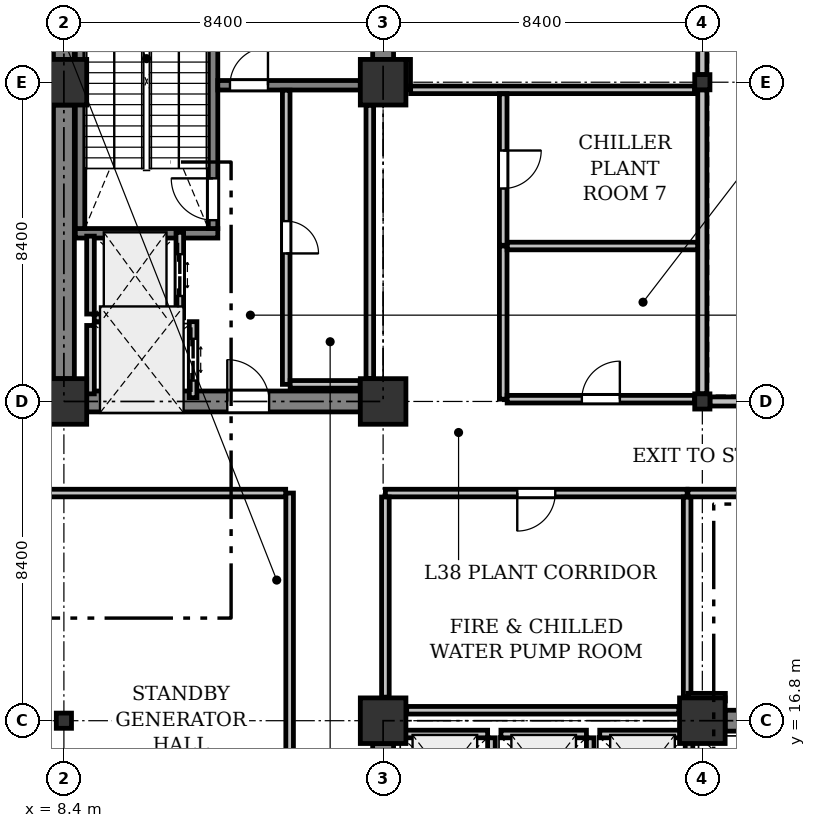
"""IFC4 building model, lengths in metres.
Left out: names, types, materials, properties, quantities, classifications, styles, units other than length and angle.
Written with IfcOpenShell. Run it as: python <this file> out.ifc"""

import sys

from ifc_helpers import new_model, si_unit, direction, frame, frame_2d, origin, origin_2d, place, context, subcontext, project, spatial, rectangle, i_section, extrude, element, fill, save


model = new_model("IFC4")
c1 = context("Model", 3, precision=1e-05, world=origin(), true_north=direction((0.0, 1.0)))
c2 = subcontext(c1, "Body", "Model", "MODEL_VIEW")
j1 = project(units=[si_unit("LENGTHUNIT", "METRE"), si_unit("PLANEANGLEUNIT", "RADIAN")], contexts=[c1])
p1 = place(None, origin())
s1 = spatial("IfcSite", under=j1, at=p1, CompositionType="ELEMENT")
p2 = place(p1, origin())
s2 = spatial("IfcBuilding", under=s1, at=p2, CompositionType="ELEMENT")
p3 = place(p2, frame((0.0, 0.0, 162.3)))
s3 = spatial("IfcBuildingStorey", under=s2, at=p3, CompositionType="ELEMENT", Elevation=162.3)
p4 = place(p3, frame((8.4, 16.8, 0.0), z_axis=(0.0, 0.0, 1.0), x_axis=(1.0, 0.0, 0.0)))
e1 = element("IfcColumn", 1, at=p4, inside=s3, PredefinedType="COLUMN", context=c2, shape_type="SweptSolid", body=[
    extrude(i_section(OverallWidth=0.4, OverallDepth=0.4, WebThickness=0.025, FlangeThickness=0.04, at=origin_2d()), origin(), (0.0, 0.0, 1.0), 5.0),
])
for number, where, z_axis, x_axis in (
    (2, (8.4, 25.2, 0.0), (0.0, 0.0, 1.0), (1.0, 0.0, 0.0)),
    (3, (8.4, 33.6, 0.0), (0.0, 0.0, 1.0), (1.0, 0.0, 0.0)),
    (4, (16.8, 16.8, 0.0), (0.0, 0.0, 1.0), (1.0, 0.0, 0.0)),
    (5, (16.8, 25.2, 0.0), (0.0, 0.0, 1.0), (1.0, 0.0, 0.0)),
    (6, (16.8, 33.6, 0.0), (0.0, 0.0, 1.0), (1.0, 0.0, 0.0)),
    (7, (25.2, 16.8, 0.0), (0.0, 0.0, 1.0), (1.0, 0.0, 0.0)),
):
    element("IfcColumn", number, at=place(p3, frame(where, z_axis=z_axis, x_axis=x_axis)), inside=s3, PredefinedType="COLUMN", context=c2, shape_type="SweptSolid", body=[
        extrude(rectangle(XDim=1.2, YDim=1.2, at=origin_2d()), origin(), (0.0, 0.0, 1.0), 5.0),
    ])
for number, where, z_axis, x_axis in (
    (8, (25.2, 25.2, 0.0), (0.0, 0.0, 1.0), (1.0, 0.0, 0.0)),
    (9, (25.2, 33.6, 0.0), (0.0, 0.0, 1.0), (1.0, 0.0, 0.0)),
):
    element("IfcColumn", number, at=place(p3, frame(where, z_axis=z_axis, x_axis=x_axis)), inside=s3, PredefinedType="COLUMN", context=c2, shape_type="SweptSolid", body=[
        extrude(i_section(OverallWidth=0.4, OverallDepth=0.4, WebThickness=0.025, FlangeThickness=0.04, at=origin_2d()), origin(), (0.0, 0.0, 1.0), 5.0),
    ])
for number, where, z_axis, x_axis in (
    (10, (25.2, 41.8, 0.0), (0.0, 0.0, 1.0), (0.0, -1.0, 0.0)),
    (11, (25.2, 33.4, 0.0), (0.0, 0.0, 1.0), (0.0, -1.0, 0.0)),
    (12, (25.4, 25.2, 0.0), (0.0, 0.0, 1.0), (1.0, 0.0, 0.0)),
):
    element("IfcWall", number, at=place(p3, frame(where, z_axis=z_axis, x_axis=x_axis)), inside=s3, PredefinedType="STANDARD", context=c2, shape_type="SweptSolid", body=[
        extrude(rectangle(XDim=8.0, YDim=0.24, at=frame_2d((4.0, 0.0))), origin(), (0.0, 0.0, 1.0), 4.425),
    ])
for number, where, z_axis, x_axis in (
    (13, (8.4, 25.8, 0.0), (0.0, 0.0, 1.0), (0.0, 1.0, 0.0)),
    (14, (8.4, 34.2, 0.0), (0.0, 0.0, 1.0), (0.0, 1.0, 0.0)),
):
    element("IfcWall", number, at=place(p3, frame(where, z_axis=z_axis, x_axis=x_axis)), inside=s3, PredefinedType="SHEAR", context=c2, shape_type="SweptSolid", body=[
        extrude(rectangle(XDim=7.2, YDim=0.55, at=frame_2d((3.6, 0.0))), origin(), (0.0, 0.0, 1.0), 4.725),
    ])
p5 = place(p3, frame((16.8, 34.2, 0.0), z_axis=(0.0, 0.0, 1.0), x_axis=(0.0, 1.0, 0.0)))
e15 = element("IfcWall", 15, at=p5, inside=s3, PredefinedType="SHEAR", context=c2, shape_type="SweptSolid", body=[
    extrude(rectangle(XDim=7.2, YDim=0.55, at=frame_2d((3.6, 0.0))), origin(), (0.0, 0.0, 1.0), 4.725),
])
p6 = place(p5, frame((0.9, 0.0, 0.0)))
e16 = element("IfcOpeningElement", 16, at=p6, cuts=e15, PredefinedType="OPENING", context=c2, shape_type="SweptSolid", body=[
    extrude(rectangle(XDim=1.1, YDim=2.15, at=frame_2d((0.55, 1.075))), frame((0.0, 0.285, 0.0), z_axis=(0.0, -1.0, 0.0), x_axis=(1.0, 0.0, 0.0)), (0.0, 0.0, 1.0), 0.57),
])
p7 = place(p3, frame((9.0, 25.2, 0.0), z_axis=(0.0, 0.0, 1.0), x_axis=(1.0, 0.0, 0.0)))
e17 = element("IfcWall", 17, at=p7, inside=s3, PredefinedType="SHEAR", context=c2, shape_type="SweptSolid", body=[
    extrude(rectangle(XDim=7.2, YDim=0.55, at=frame_2d((3.6, 0.0))), origin(), (0.0, 0.0, 1.0), 4.725),
])
p8 = place(p7, frame((3.7, 0.0, 0.0)))
e18 = element("IfcOpeningElement", 18, at=p8, cuts=e17, PredefinedType="OPENING", context=c2, shape_type="SweptSolid", body=[
    extrude(rectangle(XDim=1.1, YDim=2.15, at=frame_2d((0.55, 1.075))), frame((0.0, 0.285, 0.0), z_axis=(0.0, -1.0, 0.0), x_axis=(1.0, 0.0, 0.0)), (0.0, 0.0, 1.0), 0.57),
])
p9 = place(p3, frame((16.8, 9.0, 0.0), z_axis=(0.0, 0.0, 1.0), x_axis=(0.0, 1.0, 0.0)))
e19 = element("IfcWall", 19, at=p9, inside=s3, PredefinedType="SHEAR", context=c2, shape_type="SweptSolid", body=[
    extrude(rectangle(XDim=7.2, YDim=0.55, at=frame_2d((3.6, 0.0))), origin(), (0.0, 0.0, 1.0), 4.725),
])
p10 = place(p9, frame((3.25, 0.0, 0.0)))
e20 = element("IfcOpeningElement", 20, at=p10, cuts=e19, PredefinedType="OPENING", context=c2, shape_type="SweptSolid", body=[
    extrude(rectangle(XDim=1.1, YDim=2.15, at=frame_2d((0.55, 1.075))), frame((0.0, 0.285, 0.0), z_axis=(0.0, -1.0, 0.0), x_axis=(1.0, 0.0, 0.0)), (0.0, 0.0, 1.0), 0.57),
])
p11 = place(p3, frame((25.8, 16.8, 0.0), z_axis=(0.0, 0.0, 1.0), x_axis=(1.0, 0.0, 0.0)))
e21 = element("IfcWall", 21, at=p11, inside=s3, PredefinedType="SHEAR", context=c2, shape_type="SweptSolid", body=[
    extrude(rectangle(XDim=7.2, YDim=0.55, at=frame_2d((3.6, 0.0))), origin(), (0.0, 0.0, 1.0), 4.725),
])
p12 = place(p3, frame((12.45, 29.625, 0.0), z_axis=(0.0, 0.0, 1.0), x_axis=(-1.0, 0.0, 0.0)))
e22 = element("IfcWall", 22, at=p12, inside=s3, PredefinedType="SHEAR", context=c2, shape_type="SweptSolid", body=[
    extrude(rectangle(XDim=3.75, YDim=0.25, at=frame_2d((1.875, 0.0))), origin(), (0.0, 0.0, 1.0), 4.725),
])
p13 = place(p3, frame((12.325, 29.75, 0.0), z_axis=(0.0, 0.0, 1.0), x_axis=(0.0, 1.0, 0.0)))
e23 = element("IfcWall", 23, at=p13, inside=s3, PredefinedType="SHEAR", context=c2, shape_type="SweptSolid", body=[
    extrude(rectangle(XDim=7.75, YDim=0.25, at=frame_2d((3.875, 0.0))), origin(), (0.0, 0.0, 1.0), 4.725),
])
p14 = place(p13, frame((0.22, 0.0, 0.0)))
e24 = element("IfcOpeningElement", 24, at=p14, cuts=e23, PredefinedType="OPENING", context=c2, shape_type="SweptSolid", body=[
    extrude(rectangle(XDim=1.1, YDim=2.15, at=frame_2d((0.55, 1.075))), frame((0.0, 0.135, 0.0), z_axis=(0.0, -1.0, 0.0), x_axis=(1.0, 0.0, 0.0)), (0.0, 0.0, 1.0), 0.27),
])
p15 = place(p3, frame((8.825, 29.75, 0.0), z_axis=(0.0, 0.0, 1.0), x_axis=(0.0, 1.0, 0.0)))
e25 = element("IfcWall", 25, at=p15, inside=s3, PredefinedType="SHEAR", context=c2, shape_type="SweptSolid", body=[
    extrude(rectangle(XDim=7.75, YDim=0.25, at=frame_2d((3.875, 0.0))), origin(), (0.0, 0.0, 1.0), 4.725),
])
p16 = place(p3, frame((12.45, 33.52, 0.0), z_axis=(0.0, 0.0, 1.0), x_axis=(1.0, 0.0, 0.0)))
e26 = element("IfcWall", 26, at=p16, inside=s3, PredefinedType="SHEAR", context=c2, shape_type="SweptSolid", body=[
    extrude(rectangle(XDim=3.75, YDim=0.25, at=frame_2d((1.875, 0.0))), origin(), (0.0, 0.0, 1.0), 4.725),
])
p17 = place(p16, frame((0.32, 0.0, 0.0)))
e27 = element("IfcOpeningElement", 27, at=p17, cuts=e26, PredefinedType="OPENING", context=c2, shape_type="SweptSolid", body=[
    extrude(rectangle(XDim=1.0, YDim=2.15, at=frame_2d((0.5, 1.075))), frame((0.0, 0.135, 0.0), z_axis=(0.0, -1.0, 0.0), x_axis=(1.0, 0.0, 0.0)), (0.0, 0.0, 1.0), 0.27),
])
p18 = place(p3, frame((11.45, 27.4, 0.0), z_axis=(0.0, 0.0, 1.0), x_axis=(0.0, 1.0, 0.0)))
e28 = element("IfcWall", 28, at=p18, inside=s3, PredefinedType="PARTITIONING", context=c2, shape_type="SweptSolid", body=[
    extrude(rectangle(XDim=2.25, YDim=0.2, at=frame_2d((1.125, 0.0))), origin(), (0.0, 0.0, 1.0), 4.725),
])
p19 = place(p18, frame((0.575, 0.0, 0.0)))
e29 = element("IfcOpeningElement", 29, at=p19, cuts=e28, PredefinedType="OPENING", context=c2, shape_type="SweptSolid", body=[
    extrude(rectangle(XDim=1.1, YDim=2.2, at=frame_2d((0.55, 1.1))), frame((0.0, 0.11, 0.0), z_axis=(0.0, -1.0, 0.0), x_axis=(1.0, 0.0, 0.0)), (0.0, 0.0, 1.0), 0.22),
])
p20 = place(p3, frame((9.1, 27.5, 0.0), z_axis=(0.0, 0.0, 1.0), x_axis=(0.0, 1.0, 0.0)))
e30 = element("IfcWall", 30, at=p20, inside=s3, PredefinedType="PARTITIONING", context=c2, shape_type="SweptSolid", body=[
    extrude(rectangle(XDim=2.05, YDim=0.2, at=frame_2d((1.025, 0.0))), origin(), (0.0, 0.0, 1.0), 4.725),
])
p21 = place(p3, frame((9.2, 27.4, 0.0), z_axis=(0.0, 0.0, 1.0), x_axis=(1.0, 0.0, 0.0)))
e31 = element("IfcWall", 31, at=p21, inside=s3, PredefinedType="PARTITIONING", context=c2, shape_type="SweptSolid", body=[
    extrude(rectangle(XDim=2.15, YDim=0.2, at=frame_2d((1.075, 0.0))), origin(), (0.0, 0.0, 1.0), 4.725),
])
p22 = place(p3, frame((11.8, 25.3, 0.0), z_axis=(0.0, 0.0, 1.0), x_axis=(0.0, 1.0, 0.0)))
e32 = element("IfcWall", 32, at=p22, inside=s3, PredefinedType="PARTITIONING", context=c2, shape_type="SweptSolid", body=[
    extrude(rectangle(XDim=2.0, YDim=0.2, at=frame_2d((1.0, 0.0))), origin(), (0.0, 0.0, 1.0), 4.725),
])
p23 = place(p22, frame((0.45, 0.0, 0.0)))
e33 = element("IfcOpeningElement", 33, at=p23, cuts=e32, PredefinedType="OPENING", context=c2, shape_type="SweptSolid", body=[
    extrude(rectangle(XDim=1.1, YDim=2.2, at=frame_2d((0.55, 1.1))), frame((0.0, 0.11, 0.0), z_axis=(0.0, -1.0, 0.0), x_axis=(1.0, 0.0, 0.0)), (0.0, 0.0, 1.0), 0.22),
])
p24 = place(p3, frame((9.1, 25.4, 0.0), z_axis=(0.0, 0.0, 1.0), x_axis=(0.0, 1.0, 0.0)))
e34 = element("IfcWall", 34, at=p24, inside=s3, PredefinedType="PARTITIONING", context=c2, shape_type="SweptSolid", body=[
    extrude(rectangle(XDim=1.8, YDim=0.2, at=frame_2d((0.9, 0.0))), origin(), (0.0, 0.0, 1.0), 4.725),
])
p25 = place(p3, frame((19.65, 14.3, 0.0), z_axis=(0.0, 0.0, 1.0), x_axis=(0.0, 1.0, 0.0)))
e35 = element("IfcWall", 35, at=p25, inside=s3, PredefinedType="PARTITIONING", context=c2, shape_type="SweptSolid", body=[
    extrude(rectangle(XDim=2.05, YDim=0.2, at=frame_2d((1.025, 0.0))), origin(), (0.0, 0.0, 1.0), 4.725),
])
p26 = place(p3, frame((17.3, 16.45, 0.0), z_axis=(0.0, 0.0, 1.0), x_axis=(1.0, 0.0, 0.0)))
e36 = element("IfcWall", 36, at=p26, inside=s3, PredefinedType="PARTITIONING", context=c2, shape_type="SweptSolid", body=[
    extrude(rectangle(XDim=2.25, YDim=0.2, at=frame_2d((1.125, 0.0))), origin(), (0.0, 0.0, 1.0), 4.725),
])
p27 = place(p3, frame((22.25, 14.3, 0.0), z_axis=(0.0, 0.0, 1.0), x_axis=(0.0, 1.0, 0.0)))
e37 = element("IfcWall", 37, at=p27, inside=s3, PredefinedType="PARTITIONING", context=c2, shape_type="SweptSolid", body=[
    extrude(rectangle(XDim=2.05, YDim=0.2, at=frame_2d((1.025, 0.0))), origin(), (0.0, 0.0, 1.0), 4.725),
])
p28 = place(p3, frame((19.9, 16.45, 0.0), z_axis=(0.0, 0.0, 1.0), x_axis=(1.0, 0.0, 0.0)))
e38 = element("IfcWall", 38, at=p28, inside=s3, PredefinedType="PARTITIONING", context=c2, shape_type="SweptSolid", body=[
    extrude(rectangle(XDim=2.25, YDim=0.2, at=frame_2d((1.125, 0.0))), origin(), (0.0, 0.0, 1.0), 4.725),
])
p29 = place(p3, frame((24.85, 14.3, 0.0), z_axis=(0.0, 0.0, 1.0), x_axis=(0.0, 1.0, 0.0)))
e39 = element("IfcWall", 39, at=p29, inside=s3, PredefinedType="PARTITIONING", context=c2, shape_type="SweptSolid", body=[
    extrude(rectangle(XDim=2.05, YDim=0.2, at=frame_2d((1.025, 0.0))), origin(), (0.0, 0.0, 1.0), 4.725),
])
p30 = place(p3, frame((22.5, 16.45, 0.0), z_axis=(0.0, 0.0, 1.0), x_axis=(1.0, 0.0, 0.0)))
e40 = element("IfcWall", 40, at=p30, inside=s3, PredefinedType="PARTITIONING", context=c2, shape_type="SweptSolid", body=[
    extrude(rectangle(XDim=2.25, YDim=0.2, at=frame_2d((1.125, 0.0))), origin(), (0.0, 0.0, 1.0), 4.725),
])
p31 = place(p3, frame((16.45, 25.805, 0.0), z_axis=(0.0, 0.0, 1.0), x_axis=(0.0, 1.0, 0.0)))
e41 = element("IfcWall", 41, at=p31, inside=s3, PredefinedType="PARTITIONING", context=c2, shape_type="SweptSolid", body=[
    extrude(rectangle(XDim=7.19, YDim=0.2, at=frame_2d((3.595, 0.0))), origin(), (0.0, 0.0, 1.0), 4.725),
])
p32 = place(p3, frame((14.25, 33.39, 0.0), z_axis=(0.0, 0.0, 1.0), x_axis=(0.0, -1.0, 0.0)))
e42 = element("IfcWall", 42, at=p32, inside=s3, PredefinedType="PARTITIONING", context=c2, shape_type="SweptSolid", body=[
    extrude(rectangle(XDim=7.74, YDim=0.2, at=frame_2d((3.87, 0.0))), origin(), (0.0, 0.0, 1.0), 4.725),
])
p33 = place(p32, frame((3.445, 0.0, 0.0)))
e43 = element("IfcOpeningElement", 43, at=p33, cuts=e42, PredefinedType="OPENING", context=c2, shape_type="SweptSolid", body=[
    extrude(rectangle(XDim=0.85, YDim=2.15, at=frame_2d((0.425, 1.075))), frame((0.0, 0.11, 0.0), z_axis=(0.0, -1.0, 0.0), x_axis=(1.0, 0.0, 0.0)), (0.0, 0.0, 1.0), 0.22),
])
p34 = place(p3, frame((14.354, 25.65, 0.0), z_axis=(0.0, 0.0, 1.0), x_axis=(1.0, 0.0, 0.0)))
e44 = element("IfcWall", 44, at=p34, inside=s3, PredefinedType="PARTITIONING", context=c2, shape_type="SweptSolid", body=[
    extrude(rectangle(XDim=1.841, YDim=0.2, at=frame_2d((0.92, 0.0))), origin(), (0.0, 0.0, 1.0), 4.725),
])
p35 = place(p3, frame((17.42, 34.2, 0.0), z_axis=(0.0, 0.0, 1.0), x_axis=(0.0, -1.0, 0.0)))
e45 = element("IfcWall", 45, at=p35, inside=s3, PredefinedType="PARTITIONING", context=c2, shape_type="SweptSolid", body=[
    extrude(rectangle(XDim=0.8, YDim=0.2, at=frame_2d((0.4, 0.0))), origin(), (0.0, 0.0, 1.0), 3.825),
])
p36 = place(p3, frame((17.524, 33.4, 0.0), z_axis=(0.0, 0.0, 1.0), x_axis=(1.0, 0.0, 0.0)))
e46 = element("IfcWall", 46, at=p36, inside=s3, PredefinedType="PARTITIONING", context=c2, shape_type="SweptSolid", body=[
    extrude(rectangle(XDim=7.471, YDim=0.2, at=frame_2d((3.736, 0.0))), origin(), (0.0, 0.0, 1.0), 3.825),
])
p37 = place(p3, frame((14.34, 5.4, 0.0), z_axis=(0.0, 0.0, 1.0), x_axis=(0.0, 1.0, 0.0)))
e47 = element("IfcWall", 47, at=p37, inside=s3, PredefinedType="PARTITIONING", context=c2, shape_type="SweptSolid", body=[
    extrude(rectangle(XDim=17.39, YDim=0.2, at=frame_2d((8.695, 0.0))), origin(), (0.0, 0.0, 1.0), 3.825),
])
p38 = place(p3, frame((14.236, 22.79, 0.0), z_axis=(0.0, 0.0, 1.0), x_axis=(-1.0, 0.0, 0.0)))
e48 = element("IfcWall", 48, at=p38, inside=s3, PredefinedType="PARTITIONING", context=c2, shape_type="SweptSolid", body=[
    extrude(rectangle(XDim=6.526, YDim=0.2, at=frame_2d((3.263, 0.0))), origin(), (0.0, 0.0, 1.0), 3.709),
])
p39 = place(p3, frame((24.8, 22.79, 0.0), z_axis=(0.0, 0.0, 1.0), x_axis=(-1.0, 0.0, 0.0)))
e49 = element("IfcWall", 49, at=p39, inside=s3, PredefinedType="PARTITIONING", context=c2, shape_type="SweptSolid", body=[
    extrude(rectangle(XDim=7.94, YDim=0.2, at=frame_2d((3.97, 0.0))), origin(), (0.0, 0.0, 1.0), 3.709),
])
p40 = place(p39, frame((3.47, 0.0, 0.0)))
e50 = element("IfcOpeningElement", 50, at=p40, cuts=e49, PredefinedType="OPENING", context=c2, shape_type="SweptSolid", body=[
    extrude(rectangle(XDim=1.0, YDim=2.15, at=frame_2d((0.5, 1.075))), frame((0.0, 0.11, 0.0), z_axis=(0.0, -1.0, 0.0), x_axis=(1.0, 0.0, 0.0)), (0.0, 0.0, 1.0), 0.22),
])
p41 = place(p3, frame((16.86, 22.686, 0.0), z_axis=(0.0, 0.0, 1.0), x_axis=(0.0, -1.0, 0.0)))
e51 = element("IfcWall", 51, at=p41, inside=s3, PredefinedType="PARTITIONING", context=c2, shape_type="SweptSolid", body=[
    extrude(rectangle(XDim=5.266, YDim=0.2, at=frame_2d((2.633, 0.0))), origin(), (0.0, 0.0, 1.0), 3.709),
])
p42 = place(p3, frame((17.42, 17.075, 0.0), z_axis=(0.0, 0.0, 1.0), x_axis=(1.0, 0.0, 0.0)))
e52 = element("IfcWall", 52, at=p42, inside=s3, PredefinedType="PARTITIONING", context=c2, shape_type="SweptSolid", body=[
    extrude(rectangle(XDim=7.16, YDim=0.2, at=frame_2d((3.58, 0.0))), origin(), (0.0, 0.0, 1.0), 3.825),
])
p43 = place(p3, frame((24.8, 17.42, 0.0), z_axis=(0.0, 0.0, 1.0), x_axis=(0.0, 1.0, 0.0)))
e53 = element("IfcWall", 53, at=p43, inside=s3, PredefinedType="PARTITIONING", context=c2, shape_type="SweptSolid", body=[
    extrude(rectangle(XDim=5.266, YDim=0.2, at=frame_2d((2.633, 0.0))), origin(), (0.0, 0.0, 1.0), 4.725),
])
p44 = place(p3, frame((32.636, 22.79, 0.0), z_axis=(0.0, 0.0, 1.0), x_axis=(-1.0, 0.0, 0.0)))
e54 = element("IfcWall", 54, at=p44, inside=s3, PredefinedType="PARTITIONING", context=c2, shape_type="SweptSolid", body=[
    extrude(rectangle(XDim=7.816, YDim=0.2, at=frame_2d((3.908, 0.0))), origin(), (0.0, 0.0, 1.0), 3.709),
])
p45 = place(p44, frame((3.408, 0.0, 0.0)))
e55 = element("IfcOpeningElement", 55, at=p45, cuts=e54, PredefinedType="OPENING", context=c2, shape_type="SweptSolid", body=[
    extrude(rectangle(XDim=1.0, YDim=2.15, at=frame_2d((0.5, 1.075))), frame((0.0, 0.11, 0.0), z_axis=(0.0, -1.0, 0.0), x_axis=(1.0, 0.0, 0.0)), (0.0, 0.0, 1.0), 0.22),
])
p46 = place(p3, frame((24.82, 17.42, 0.0), z_axis=(0.0, 0.0, 1.0), x_axis=(0.999999724019, -0.000742941845, 0.0)))
e56 = element("IfcWall", 56, at=p46, inside=s3, PredefinedType="PARTITIONING", context=c2, shape_type="SweptSolid", body=[
    extrude(rectangle(XDim=0.986, YDim=0.2, at=frame_2d((0.493, 0.0))), origin(), (0.0, 0.0, 1.0), 3.709),
])
p47 = place(p3, frame((19.96, 29.29, 0.0), z_axis=(0.0, 0.0, 1.0), x_axis=(0.0, -1.0, 0.0)))
e57 = element("IfcWall", 57, at=p47, inside=s3, PredefinedType="PARTITIONING", context=c2, shape_type="SweptSolid", body=[
    extrude(rectangle(XDim=4.03, YDim=0.2, at=frame_2d((2.015, 0.0))), origin(), (0.0, 0.0, 1.0), 3.825),
])
p48 = place(p3, frame((20.064, 25.26, 0.0), z_axis=(0.0, 0.0, 1.0), x_axis=(1.0, 0.0, 0.0)))
e58 = element("IfcWall", 58, at=p48, inside=s3, PredefinedType="PARTITIONING", context=c2, shape_type="SweptSolid", body=[
    extrude(rectangle(XDim=4.931, YDim=0.2, at=frame_2d((2.466, 0.0))), origin(), (0.0, 0.0, 1.0), 3.825),
])
p49 = place(p48, frame((1.966, 0.0, 0.0)))
e59 = element("IfcOpeningElement", 59, at=p49, cuts=e58, PredefinedType="OPENING", context=c2, shape_type="SweptSolid", body=[
    extrude(rectangle(XDim=1.0, YDim=2.15, at=frame_2d((0.5, 1.075))), frame((0.0, 0.11, 0.0), z_axis=(0.0, -1.0, 0.0), x_axis=(1.0, 0.0, 0.0)), (0.0, 0.0, 1.0), 0.22),
])
p50 = place(p3, frame((25.076, 29.29, 0.0), z_axis=(0.0, 0.0, 1.0), x_axis=(-1.0, 0.0, 0.0)))
e60 = element("IfcWall", 60, at=p50, inside=s3, PredefinedType="PARTITIONING", context=c2, shape_type="SweptSolid", body=[
    extrude(rectangle(XDim=5.012, YDim=0.2, at=frame_2d((2.506, 0.0))), origin(), (0.0, 0.0, 1.0), 4.322),
])
p51 = place(p3, frame((19.96, 33.296, 0.0), z_axis=(0.0, 0.0, 1.0), x_axis=(0.0, -1.0, 0.0)))
e61 = element("IfcWall", 61, at=p51, inside=s3, PredefinedType="PARTITIONING", context=c2, shape_type="SweptSolid", body=[
    extrude(rectangle(XDim=3.986, YDim=0.2, at=frame_2d((1.993, 0.0))), origin(), (0.0, 0.0, 1.0), 4.725),
])
p52 = place(p51, frame((1.493, 0.0, 0.0)))
e62 = element("IfcOpeningElement", 62, at=p52, cuts=e61, PredefinedType="OPENING", context=c2, shape_type="SweptSolid", body=[
    extrude(rectangle(XDim=1.0, YDim=2.15, at=frame_2d((0.5, 1.075))), frame((0.0, 0.11, 0.0), z_axis=(0.0, -1.0, 0.0), x_axis=(1.0, 0.0, 0.0)), (0.0, 0.0, 1.0), 0.22),
])
p53 = place(p8, origin())
e63 = element("IfcDoor", 63, at=p53, inside=s3, OperationType="SINGLE_SWING_LEFT", PredefinedType="DOOR", context=c2, shape_type="SweptSolid", body=[
    extrude(rectangle(XDim=1.1, YDim=2.15, at=frame_2d((0.55, 1.075))), frame((0.0, 0.025, 0.0), z_axis=(0.0, -1.0, 0.0), x_axis=(1.0, 0.0, 0.0)), (0.0, 0.0, 1.0), 0.05),
])
fill(e18, e63)
p54 = place(p14, origin())
e64 = element("IfcDoor", 64, at=p54, inside=s3, OperationType="SINGLE_SWING_RIGHT", PredefinedType="DOOR", context=c2, shape_type="SweptSolid", body=[
    extrude(rectangle(XDim=1.1, YDim=2.15, at=frame_2d((0.55, 1.075))), frame((0.0, 0.025, 0.0), z_axis=(0.0, -1.0, 0.0), x_axis=(1.0, 0.0, 0.0)), (0.0, 0.0, 1.0), 0.05),
])
fill(e24, e64)
p55 = place(p17, origin())
e65 = element("IfcDoor", 65, at=p55, inside=s3, OperationType="SINGLE_SWING_RIGHT", PredefinedType="DOOR", context=c2, shape_type="SweptSolid", body=[
    extrude(rectangle(XDim=1.0, YDim=2.15, at=frame_2d((0.5, 1.075))), frame((0.0, 0.025, 0.0), z_axis=(0.0, -1.0, 0.0), x_axis=(1.0, 0.0, 0.0)), (0.0, 0.0, 1.0), 0.05),
])
fill(e27, e65)
p56 = place(p19, origin())
e66 = element("IfcDoor", 66, at=p56, inside=s3, OperationType="DOUBLE_DOOR_SLIDING", PredefinedType="DOOR", context=c2, shape_type="SweptSolid", body=[
    extrude(rectangle(XDim=1.1, YDim=2.2, at=frame_2d((0.55, 1.1))), frame((0.0, 0.025, 0.0), z_axis=(0.0, -1.0, 0.0), x_axis=(1.0, 0.0, 0.0)), (0.0, 0.0, 1.0), 0.05),
])
fill(e29, e66)
p57 = place(p23, origin())
e67 = element("IfcDoor", 67, at=p57, inside=s3, OperationType="DOUBLE_DOOR_SLIDING", PredefinedType="DOOR", context=c2, shape_type="SweptSolid", body=[
    extrude(rectangle(XDim=1.1, YDim=2.2, at=frame_2d((0.55, 1.1))), frame((0.0, 0.025, 0.0), z_axis=(0.0, -1.0, 0.0), x_axis=(1.0, 0.0, 0.0)), (0.0, 0.0, 1.0), 0.05),
])
fill(e33, e67)
p58 = place(p33, origin())
e68 = element("IfcDoor", 68, at=p58, inside=s3, OperationType="SINGLE_SWING_RIGHT", PredefinedType="DOOR", context=c2, shape_type="SweptSolid", body=[
    extrude(rectangle(XDim=0.85, YDim=2.15, at=frame_2d((0.425, 1.075))), frame((0.0, 0.025, 0.0), z_axis=(0.0, -1.0, 0.0), x_axis=(1.0, 0.0, 0.0)), (0.0, 0.0, 1.0), 0.05),
])
fill(e43, e68)
p59 = place(p40, origin())
e69 = element("IfcDoor", 69, at=p59, inside=s3, OperationType="SINGLE_SWING_RIGHT", PredefinedType="DOOR", context=c2, shape_type="SweptSolid", body=[
    extrude(rectangle(XDim=1.0, YDim=2.15, at=frame_2d((0.5, 1.075))), frame((0.0, 0.025, 0.0), z_axis=(0.0, -1.0, 0.0), x_axis=(1.0, 0.0, 0.0)), (0.0, 0.0, 1.0), 0.05),
])
fill(e50, e69)
p60 = place(p49, origin())
e70 = element("IfcDoor", 70, at=p60, inside=s3, OperationType="SINGLE_SWING_RIGHT", PredefinedType="DOOR", context=c2, shape_type="SweptSolid", body=[
    extrude(rectangle(XDim=1.0, YDim=2.15, at=frame_2d((0.5, 1.075))), frame((0.0, 0.025, 0.0), z_axis=(0.0, -1.0, 0.0), x_axis=(1.0, 0.0, 0.0)), (0.0, 0.0, 1.0), 0.05),
])
fill(e59, e70)
p61 = place(p52, origin())
e71 = element("IfcDoor", 71, at=p61, inside=s3, OperationType="SINGLE_SWING_LEFT", PredefinedType="DOOR", context=c2, shape_type="SweptSolid", body=[
    extrude(rectangle(XDim=1.0, YDim=2.15, at=frame_2d((0.5, 1.075))), frame((0.0, 0.025, 0.0), z_axis=(0.0, -1.0, 0.0), x_axis=(1.0, 0.0, 0.0)), (0.0, 0.0, 1.0), 0.05),
])
fill(e62, e71)
save(model, sys.argv[1])
